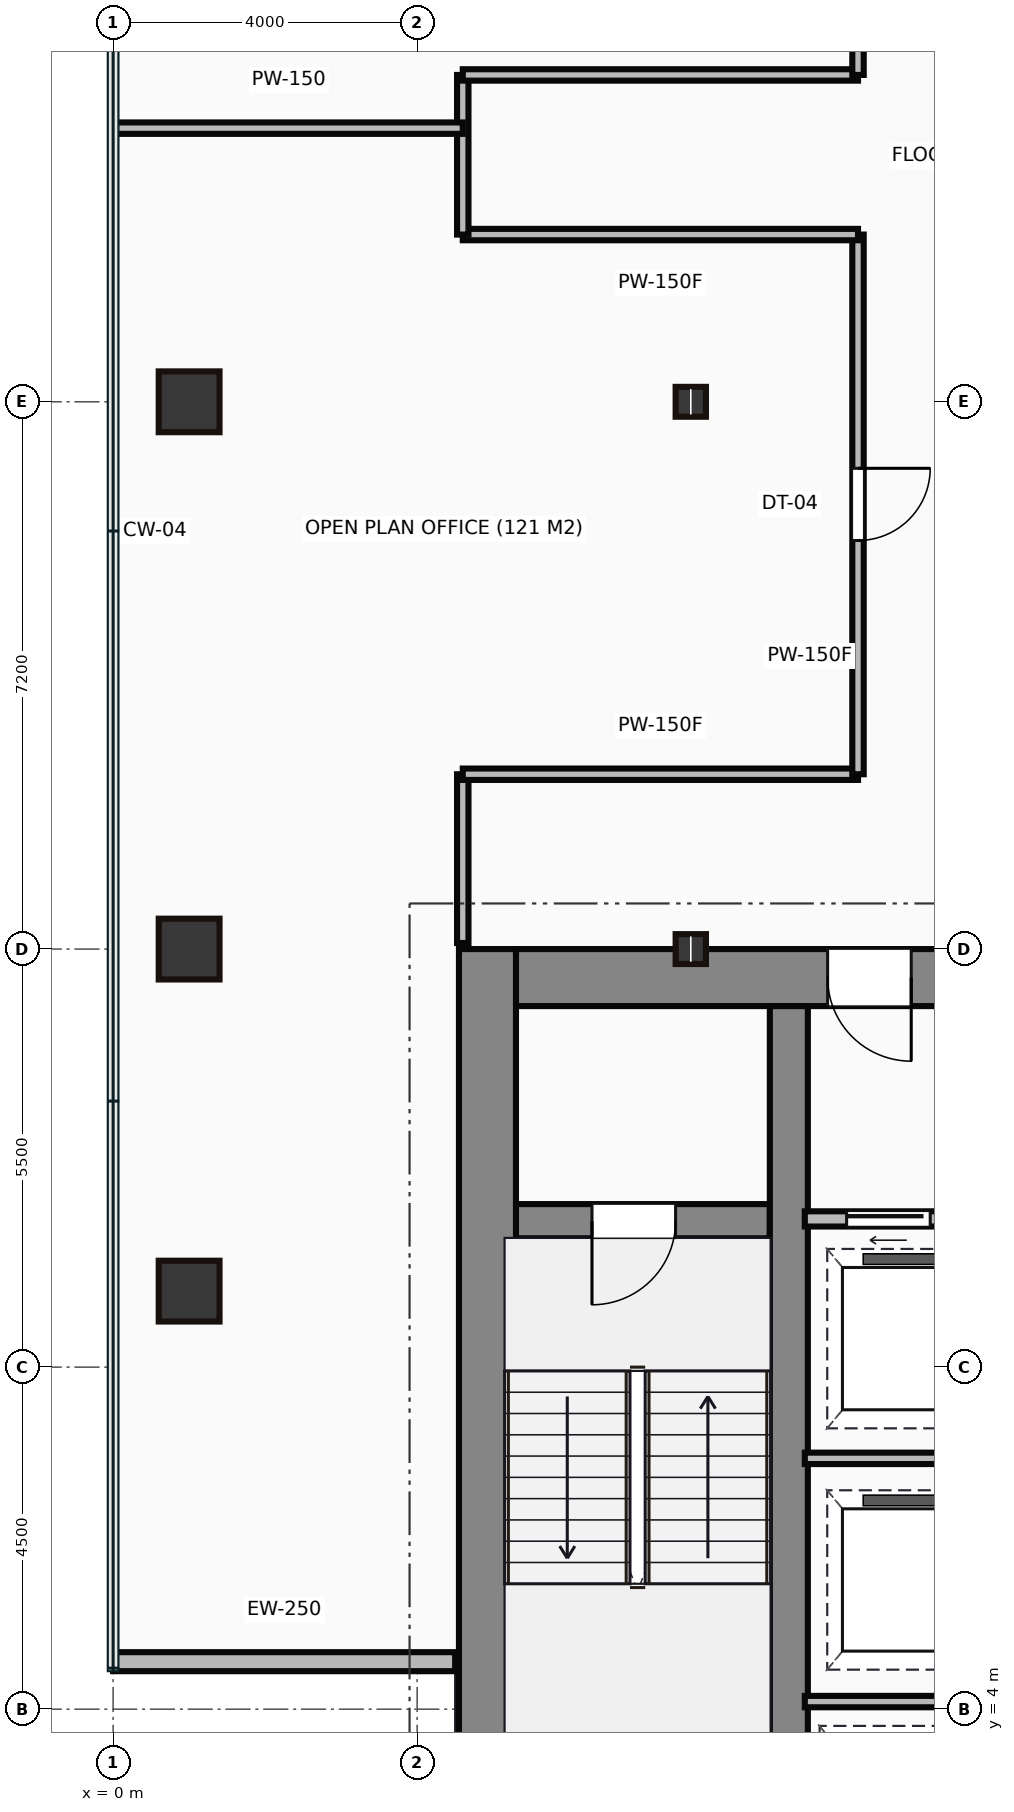
"""IFC4 building model, lengths in metres.
Left out: names, types, materials, properties, quantities, classifications, styles, units other than length and angle.
Written with IfcOpenShell. Run it as: python <this file> out.ifc"""

import sys

from ifc_helpers import new_model, si_unit, direction, frame, frame_2d, origin, origin_2d, place, context, subcontext, project, spatial, rectangle, hollow_rectangle, i_section, extrude, source, transform, mapped, element, fill, save


model = new_model("IFC4")
c1 = context("Model", 3, precision=1e-05, world=origin(), true_north=direction((0.0, 1.0)))
c2 = subcontext(c1, "Body", "Model", "MODEL_VIEW")
j1 = project(units=[si_unit("LENGTHUNIT", "METRE"), si_unit("PLANEANGLEUNIT", "RADIAN")], contexts=[c1])
p1 = place(None, origin())
s1 = spatial("IfcSite", under=j1, at=p1, CompositionType="ELEMENT")
p2 = place(p1, origin())
s2 = spatial("IfcBuilding", under=s1, at=p2, CompositionType="ELEMENT")
p3 = place(p2, frame((0.0, 0.0, 88.65)))
s3 = spatial("IfcBuildingStorey", under=s2, at=p3, CompositionType="ELEMENT", Elevation=88.65)
m1 = source(origin(), c2, "Body", "SweptSolid", [
    extrude(rectangle(XDim=13.1, YDim=0.75, at=frame_2d((6.55, 0.0))), origin(), (0.0, 0.0, 1.0), 3.65),
])
p4 = place(p3, frame((4.925, 0.9, 0.0), z_axis=(0.0, 0.0, 1.0), x_axis=(0.0, 1.0, 0.0)))
e1 = element("IfcWall", 1, at=p4, inside=s3, PredefinedType="SHEAR", context=c2, shape_type="MappedRepresentation", body=[
    mapped(m1, transform((0.0, 0.0, 0.0))),
])
m2 = source(origin(), c2, "Body", "SweptSolid", [
    extrude(rectangle(XDim=9.1, YDim=0.75, at=frame_2d((4.55, 0.0))), origin(), (0.0, 0.0, 1.0), 3.65),
])
p5 = place(p3, frame((5.3, 13.625, 0.0), z_axis=(0.0, 0.0, 1.0), x_axis=(1.0, 0.0, 0.0)))
e2 = element("IfcWall", 2, at=p5, inside=s3, PredefinedType="SHEAR", context=c2, shape_type="MappedRepresentation", body=[
    mapped(m2, transform((0.0, 0.0, 0.0))),
])
p6 = place(p5, frame((4.1, 0.0, 0.0)))
e3 = element("IfcOpeningElement", 3, at=p6, cuts=e2, PredefinedType="OPENING", context=c2, shape_type="SweptSolid", body=[
    extrude(rectangle(XDim=1.1, YDim=2.15, at=frame_2d((0.55, 1.075))), frame((0.0, 0.385, 0.0), z_axis=(0.0, -1.0, 0.0), x_axis=(1.0, 0.0, 0.0)), (0.0, 0.0, 1.0), 0.77),
])
m3 = source(origin(), c2, "Body", "SweptSolid", [
    extrude(rectangle(XDim=12.35, YDim=0.5, at=frame_2d((6.175, 0.0))), origin(), (0.0, 0.0, 1.0), 3.65),
])
p7 = place(p3, frame((8.89, 0.9, 0.0), z_axis=(0.0, 0.0, 1.0), x_axis=(0.0, 1.0, 0.0)))
e4 = element("IfcWall", 4, at=p7, inside=s3, PredefinedType="SHEAR", context=c2, shape_type="MappedRepresentation", body=[
    mapped(m3, transform((0.0, 0.0, 0.0))),
])
m4 = source(origin(), c2, "Body", "SweptSolid", [
    extrude(rectangle(XDim=3.39, YDim=0.45, at=frame_2d((1.695, 0.0))), origin(), (0.0, 0.0, 1.0), 3.65),
])
p8 = place(p3, frame((5.25, 10.42, 0.0), z_axis=(0.0, 0.0, 1.0), x_axis=(1.0, 0.0, 0.0)))
e5 = element("IfcWall", 5, at=p8, inside=s3, PredefinedType="SHEAR", context=c2, shape_type="MappedRepresentation", body=[
    mapped(m4, transform((0.0, 0.0, 0.0))),
])
p9 = place(p8, frame((1.05, 0.0, 0.0)))
e6 = element("IfcOpeningElement", 6, at=p9, cuts=e5, PredefinedType="OPENING", context=c2, shape_type="SweptSolid", body=[
    extrude(rectangle(XDim=1.1, YDim=2.15, at=frame_2d((0.55, 1.075))), frame((0.0, 0.235, 0.0), z_axis=(0.0, -1.0, 0.0), x_axis=(1.0, 0.0, 0.0)), (0.0, 0.0, 1.0), 0.47),
])
m5 = source(origin(), c2, "Body", "SweptSolid", [
    extrude(hollow_rectangle(XDim=0.8, YDim=0.8, WallThickness=0.04, at=origin_2d()), origin(), (0.0, 0.0, 1.0), 3.65),
])
for number, where, z_axis, x_axis in (
    (7, (1.0, 9.5, 0.0), (0.0, 0.0, 1.0), (1.0, 0.0, 0.0)),
    (8, (1.0, 14.0, 0.0), (0.0, 0.0, 1.0), (1.0, 0.0, 0.0)),
    (9, (1.0, 21.2, 0.0), (0.0, 0.0, 1.0), (1.0, 0.0, 0.0)),
):
    element("IfcColumn", number, at=place(p3, frame(where, z_axis=z_axis, x_axis=x_axis)), inside=s3, PredefinedType="COLUMN", context=c2, shape_type="MappedRepresentation", body=[
        mapped(m5, transform((0.0, 0.0, 0.0))),
    ])
m6 = source(origin(), c2, "Body", "SweptSolid", [
    extrude(i_section(OverallWidth=0.399, OverallDepth=0.393, WebThickness=0.023, FlangeThickness=0.037, at=origin_2d()), origin(), (0.0, 0.0, 1.0), 3.65),
])
for number, where, z_axis, x_axis in (
    (10, (7.6, 14.0, 0.0), (0.0, 0.0, 1.0), (1.0, 0.0, 0.0)),
    (11, (7.6, 21.2, 0.0), (0.0, 0.0, 1.0), (1.0, 0.0, 0.0)),
):
    element("IfcColumn", number, at=place(p3, frame(where, z_axis=z_axis, x_axis=x_axis)), inside=s3, PredefinedType="COLUMN", context=c2, shape_type="MappedRepresentation", body=[
        mapped(m6, transform((0.0, 0.0, 0.0))),
    ])
m7 = source(origin(), c2, "Body", "SweptSolid", [
    extrude(rectangle(XDim=4.5, YDim=0.25, at=frame_2d((2.25, 0.0))), origin(), (0.0, 0.0, 1.0), 3.4),
])
p10 = place(p3, frame((0.0, 4.625, 0.0), z_axis=(0.0, 0.0, 1.0), x_axis=(1.0, 0.0, 0.0)))
e12 = element("IfcWall", 12, at=p10, inside=s3, PredefinedType="STANDARD", context=c2, shape_type="MappedRepresentation", body=[
    mapped(m7, transform((0.0, 0.0, 0.0))),
])
m8 = source(origin(), c2, "Body", "SweptSolid", [
    extrude(rectangle(XDim=2.35, YDim=0.2, at=frame_2d((1.175, 0.0))), origin(), (0.0, 0.0, 1.0), 3.4),
])
p11 = place(p3, frame((9.1, 10.45, 0.0), z_axis=(0.0, 0.0, 1.0), x_axis=(1.0, 0.0, 0.0)))
e13 = element("IfcWall", 13, at=p11, inside=s3, PredefinedType="PARTITIONING", context=c2, shape_type="MappedRepresentation", body=[
    mapped(m8, transform((0.0, 0.0, 0.0))),
])
p12 = place(p11, frame((0.55, 0.0, 0.0)))
e14 = element("IfcOpeningElement", 14, at=p12, cuts=e13, PredefinedType="OPENING", context=c2, shape_type="SweptSolid", body=[
    extrude(rectangle(XDim=1.1, YDim=2.15, at=frame_2d((0.55, 1.075))), frame((0.0, 0.11, 0.0), z_axis=(0.0, -1.0, 0.0), x_axis=(1.0, 0.0, 0.0)), (0.0, 0.0, 1.0), 0.22),
])
m9 = source(origin(), c2, "Body", "SweptSolid", [
    extrude(rectangle(XDim=2.4, YDim=0.15, at=frame_2d((1.2, 0.0))), origin(), (0.0, 0.0, 1.0), 3.4),
])
for number, where, z_axis, x_axis in (
    (15, (9.1, 4.1, 0.0), (0.0, 0.0, 1.0), (1.0, 0.0, 0.0)),
    (16, (9.1, 7.3, 0.0), (0.0, 0.0, 1.0), (1.0, 0.0, 0.0)),
):
    element("IfcWall", number, at=place(p3, frame(where, z_axis=z_axis, x_axis=x_axis)), inside=s3, PredefinedType="PARTITIONING", context=c2, shape_type="MappedRepresentation", body=[
        mapped(m9, transform((0.0, 0.0, 0.0))),
    ])
m10 = source(origin(), c2, "Body", "SweptSolid", [
    extrude(rectangle(XDim=2.22, YDim=0.15, at=frame_2d((1.11, 0.0))), origin(), (0.0, 0.0, 1.0), 3.4),
])
p13 = place(p3, frame((4.6, 14.08, 0.0), z_axis=(0.0, 0.0, 1.0), x_axis=(0.0, 1.0, 0.0)))
e17 = element("IfcWall", 17, at=p13, inside=s3, PredefinedType="PARTITIONING", context=c2, shape_type="MappedRepresentation", body=[
    mapped(m10, transform((0.0, 0.0, 0.0))),
])
m11 = source(origin(), c2, "Body", "SweptSolid", [
    extrude(rectangle(XDim=5.2, YDim=0.15, at=frame_2d((2.6, 0.0))), origin(), (0.0, 0.0, 1.0), 3.4),
])
p14 = place(p3, frame((4.6, 16.3, 0.0), z_axis=(0.0, 0.0, 1.0), x_axis=(1.0, 0.0, 0.0)))
e18 = element("IfcWall", 18, at=p14, inside=s3, PredefinedType="PARTITIONING", context=c2, shape_type="MappedRepresentation", body=[
    mapped(m11, transform((0.0, 0.0, 0.0))),
])
m12 = source(origin(), c2, "Body", "SweptSolid", [
    extrude(rectangle(XDim=7.1, YDim=0.15, at=frame_2d((3.55, 0.0))), origin(), (0.0, 0.0, 1.0), 3.4),
])
p15 = place(p3, frame((9.8, 16.3, 0.0), z_axis=(0.0, 0.0, 1.0), x_axis=(0.0, 1.0, 0.0)))
e19 = element("IfcWall", 19, at=p15, inside=s3, PredefinedType="PARTITIONING", context=c2, shape_type="MappedRepresentation", body=[
    mapped(m12, transform((0.0, 0.0, 0.0))),
])
p16 = place(p15, frame((3.075, 0.0, 0.0)))
e20 = element("IfcOpeningElement", 20, at=p16, cuts=e19, PredefinedType="OPENING", context=c2, shape_type="SweptSolid", body=[
    extrude(rectangle(XDim=0.95, YDim=2.15, at=frame_2d((0.475, 1.075))), frame((0.0, 0.085, 0.0), z_axis=(0.0, -1.0, 0.0), x_axis=(1.0, 0.0, 0.0)), (0.0, 0.0, 1.0), 0.17),
])
m13 = source(origin(), c2, "Body", "SweptSolid", [
    extrude(rectangle(XDim=5.2, YDim=0.15, at=frame_2d((2.6, 0.0))), origin(), (0.0, 0.0, 1.0), 2.988),
])
p17 = place(p3, frame((9.8, 23.4, 0.0), z_axis=(0.0, 0.0, 1.0), x_axis=(-1.0, 0.0, 0.0)))
e21 = element("IfcWall", 21, at=p17, inside=s3, PredefinedType="PARTITIONING", context=c2, shape_type="MappedRepresentation", body=[
    mapped(m13, transform((0.0, 0.0, 0.0))),
])
m14 = source(origin(), c2, "Body", "SweptSolid", [
    extrude(rectangle(XDim=2.1, YDim=0.15, at=frame_2d((1.05, 0.0))), origin(), (0.0, 0.0, 1.0), 3.4),
])
p18 = place(p3, frame((4.6, 23.4, 0.0), z_axis=(0.0, 0.0, 1.0), x_axis=(0.0, 1.0, 0.0)))
e22 = element("IfcWall", 22, at=p18, inside=s3, PredefinedType="PARTITIONING", context=c2, shape_type="MappedRepresentation", body=[
    mapped(m14, transform((0.0, 0.0, 0.0))),
])
p19 = place(p3, frame((4.6, 25.5, 0.0), z_axis=(0.0, 0.0, 1.0), x_axis=(1.0, 0.0, 0.0)))
e23 = element("IfcWall", 23, at=p19, inside=s3, PredefinedType="PARTITIONING", context=c2, shape_type="MappedRepresentation", body=[
    mapped(m13, transform((0.0, 0.0, 0.0))),
])
m15 = source(origin(), c2, "Body", "SweptSolid", [
    extrude(rectangle(XDim=9.0, YDim=0.15, at=frame_2d((4.5, 0.0))), origin(), (0.0, 0.0, 1.0), 3.4),
])
p20 = place(p3, frame((9.8, 25.5, 0.0), z_axis=(0.0, 0.0, 1.0), x_axis=(0.0, 1.0, 0.0)))
e24 = element("IfcWall", 24, at=p20, inside=s3, PredefinedType="PARTITIONING", context=c2, shape_type="MappedRepresentation", body=[
    mapped(m15, transform((0.0, 0.0, 0.0))),
])
p21 = place(p20, frame((3.805, 0.0, 0.0)))
e25 = element("IfcOpeningElement", 25, at=p21, cuts=e24, PredefinedType="OPENING", context=c2, shape_type="SweptSolid", body=[
    extrude(rectangle(XDim=0.95, YDim=2.15, at=frame_2d((0.475, 1.075))), frame((0.0, 0.085, 0.0), z_axis=(0.0, -1.0, 0.0), x_axis=(1.0, 0.0, 0.0)), (0.0, 0.0, 1.0), 0.17),
])
m16 = source(origin(), c2, "Body", "SweptSolid", [
    extrude(rectangle(XDim=4.58, YDim=0.15, at=frame_2d((2.29, 0.0))), origin(), (0.0, 0.0, 1.0), 3.4),
])
p22 = place(p3, frame((0.02, 24.8, 0.0), z_axis=(0.0, 0.0, 1.0), x_axis=(1.0, 0.0, 0.0)))
e26 = element("IfcWall", 26, at=p22, inside=s3, PredefinedType="PARTITIONING", context=c2, shape_type="MappedRepresentation", body=[
    mapped(m16, transform((0.0, 0.0, 0.0))),
])
m17 = source(origin(), c2, "Body", "SweptSolid", [
    extrude(rectangle(XDim=1.1, YDim=2.15, at=frame_2d((0.55, 1.075))), frame((0.0, 0.025, 0.0), z_axis=(0.0, -1.0, 0.0), x_axis=(1.0, 0.0, 0.0)), (0.0, 0.0, 1.0), 0.05),
])
p23 = place(p9, frame((1.1, 0.0, 0.0), z_axis=(0.0, 0.0, 1.0), x_axis=(-1.0, 0.0, 0.0)))
e27 = element("IfcDoor", 27, at=p23, inside=s3, OperationType="SINGLE_SWING_LEFT", PredefinedType="DOOR", context=c2, shape_type="MappedRepresentation", body=[
    mapped(m17, transform((0.0, 0.0, 0.0))),
])
fill(e6, e27)
p24 = place(p6, origin())
e28 = element("IfcDoor", 28, at=p24, inside=s3, OperationType="SINGLE_SWING_RIGHT", PredefinedType="DOOR", context=c2, shape_type="MappedRepresentation", body=[
    mapped(m17, transform((0.0, 0.0, 0.0))),
])
fill(e3, e28)
p25 = place(p12, origin())
e29 = element("IfcDoor", 29, at=p25, inside=s3, OperationType="SLIDING_TO_LEFT", PredefinedType="DOOR", context=c2, shape_type="MappedRepresentation", body=[
    mapped(m17, transform((0.0, 0.0, 0.0))),
])
fill(e14, e29)
m18 = source(origin(), c2, "Body", "SweptSolid", [
    extrude(rectangle(XDim=0.95, YDim=2.15, at=frame_2d((0.475, 1.075))), frame((0.0, 0.025, 0.0), z_axis=(0.0, -1.0, 0.0), x_axis=(1.0, 0.0, 0.0)), (0.0, 0.0, 1.0), 0.05),
])
p26 = place(p16, origin())
e30 = element("IfcDoor", 30, at=p26, inside=s3, OperationType="SINGLE_SWING_RIGHT", PredefinedType="DOOR", context=c2, shape_type="MappedRepresentation", body=[
    mapped(m18, transform((0.0, 0.0, 0.0))),
])
fill(e20, e30)
save(model, sys.argv[1])
